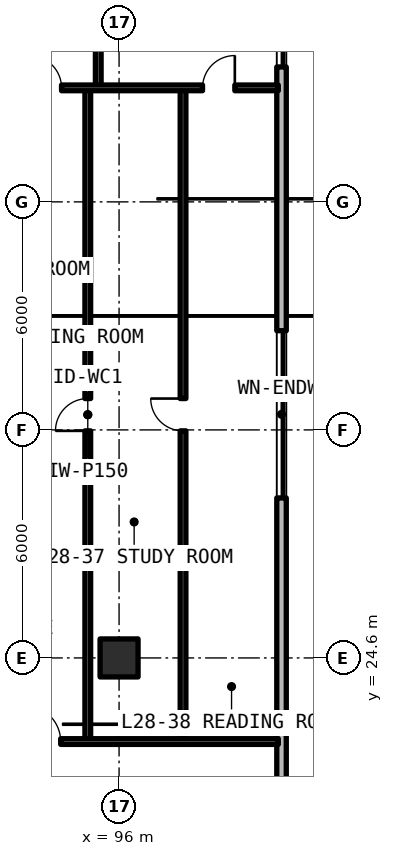
"""IFC4 building model, lengths in metres.
Left out: names, types, materials, properties, quantities, classifications, styles, units other than length and angle.
Written with IfcOpenShell. Run it as: python <this file> out.ifc"""

import sys

from ifc_helpers import new_model, si_unit, direction, frame, frame_2d, origin, origin_2d, place, context, subcontext, project, spatial, rectangle, extrude, element, fill, save


model = new_model("IFC4")
c1 = context("Model", 3, precision=1e-05, world=origin(), true_north=direction((0.0, 1.0)))
c2 = subcontext(c1, "Body", "Model", "MODEL_VIEW")
j1 = project(units=[si_unit("LENGTHUNIT", "METRE"), si_unit("PLANEANGLEUNIT", "RADIAN")], contexts=[c1])
p1 = place(None, origin())
s1 = spatial("IfcSite", under=j1, at=p1, CompositionType="ELEMENT")
p2 = place(p1, origin())
s2 = spatial("IfcBuilding", under=s1, at=p2, CompositionType="ELEMENT")
p3 = place(p2, frame((0.0, 0.0, 101.97)))
s3 = spatial("IfcBuildingStorey", under=s2, at=p3, CompositionType="ELEMENT", Elevation=101.97)
p4 = place(p3, frame((96.0, 24.6, 0.0), z_axis=(0.0, 0.0, 1.0), x_axis=(1.0, 0.0, 0.0)))
e1 = element("IfcColumn", 1, at=p4, inside=s3, PredefinedType="COLUMN", context=c2, shape_type="SweptSolid", body=[
    extrude(rectangle(XDim=1.0, YDim=1.0, at=origin_2d()), origin(), (0.0, 0.0, 1.0), 3.3),
])
p5 = place(p3, frame((100.275, 13.852, 0.0), z_axis=(0.0, 0.0, 1.0), x_axis=(0.0, 1.0, 0.0)))
e2 = element("IfcWall", 2, at=p5, inside=s3, PredefinedType="SOLIDWALL", context=c2, shape_type="SweptSolid", body=[
    extrude(rectangle(XDim=39.496, YDim=0.25, at=frame_2d((19.748, 0.0))), origin(), (0.0, 0.0, 1.0), 3.08),
])
p6 = place(p5, frame((1.948, 0.0, 0.0)))
e3 = element("IfcOpeningElement", 3, at=p6, cuts=e2, PredefinedType="OPENING", context=c2, shape_type="SweptSolid", body=[
    extrude(rectangle(XDim=1.1, YDim=2.15, at=frame_2d((0.55, 1.075))), frame((0.0, 0.135, 0.0), z_axis=(0.0, -1.0, 0.0), x_axis=(1.0, 0.0, 0.0)), (0.0, 0.0, 1.0), 0.27),
])
p7 = place(p5, frame((36.448, 0.0, 0.0)))
e4 = element("IfcOpeningElement", 4, at=p7, cuts=e2, PredefinedType="OPENING", context=c2, shape_type="SweptSolid", body=[
    extrude(rectangle(XDim=1.1, YDim=2.15, at=frame_2d((0.55, 1.075))), frame((0.0, 0.135, 0.0), z_axis=(0.0, -1.0, 0.0), x_axis=(1.0, 0.0, 0.0)), (0.0, 0.0, 1.0), 0.27),
])
p8 = place(p5, frame((14.958, 0.0, 0.78)))
e5 = element("IfcOpeningElement", 5, at=p8, cuts=e2, PredefinedType="OPENING", context=c2, shape_type="SweptSolid", body=[
    extrude(rectangle(XDim=4.4, YDim=1.66, at=frame_2d((2.2, 0.83))), frame((0.0, 0.135, 0.0), z_axis=(0.0, -1.0, 0.0), x_axis=(1.0, 0.0, 0.0)), (0.0, 0.0, 1.0), 0.27),
])
p9 = place(p5, frame((26.298, 0.0, 0.78)))
e6 = element("IfcOpeningElement", 6, at=p9, cuts=e2, PredefinedType="OPENING", context=c2, shape_type="SweptSolid", body=[
    extrude(rectangle(XDim=4.4, YDim=1.66, at=frame_2d((2.2, 0.83))), frame((0.0, 0.135, 0.0), z_axis=(0.0, -1.0, 0.0), x_axis=(1.0, 0.0, 0.0)), (0.0, 0.0, 1.0), 0.27),
])
p10 = place(p3, frame((95.177, 22.4, 0.0), z_axis=(0.0, 0.0, 1.0), x_axis=(0.0, 1.0, 0.0)))
e7 = element("IfcWall", 7, at=p10, inside=s3, PredefinedType="PARTITIONING", context=c2, shape_type="SweptSolid", body=[
    extrude(rectangle(XDim=17.2, YDim=0.15, at=frame_2d((8.6, 0.0))), origin(), (0.0, 0.0, 1.0), 2.35),
])
p11 = place(p10, frame((8.175, 0.0, 0.0)))
e8 = element("IfcOpeningElement", 8, at=p11, cuts=e7, PredefinedType="OPENING", context=c2, shape_type="SweptSolid", body=[
    extrude(rectangle(XDim=0.85, YDim=2.1, at=frame_2d((0.425, 1.05))), frame((0.0, 0.085, 0.0), z_axis=(0.0, -1.0, 0.0), x_axis=(1.0, 0.0, 0.0)), (0.0, 0.0, 1.0), 0.17),
])
p12 = place(p3, frame((97.683, 22.4, 0.0), z_axis=(0.0, 0.0, 1.0), x_axis=(0.0, 1.0, 0.0)))
e9 = element("IfcWall", 9, at=p12, inside=s3, PredefinedType="PARTITIONING", context=c2, shape_type="SweptSolid", body=[
    extrude(rectangle(XDim=17.2, YDim=0.15, at=frame_2d((8.6, 0.0))), origin(), (0.0, 0.0, 1.0), 2.35),
])
p13 = place(p12, frame((8.175, 0.0, 0.0)))
e10 = element("IfcOpeningElement", 10, at=p13, cuts=e9, PredefinedType="OPENING", context=c2, shape_type="SweptSolid", body=[
    extrude(rectangle(XDim=0.85, YDim=2.1, at=frame_2d((0.425, 1.05))), frame((0.0, 0.085, 0.0), z_axis=(0.0, -1.0, 0.0), x_axis=(1.0, 0.0, 0.0)), (0.0, 0.0, 1.0), 0.17),
])
p14 = place(p3, frame((95.452, 39.6, 0.0), z_axis=(0.0, 0.0, 1.0), x_axis=(0.0, 1.0, 0.0)))
e11 = element("IfcWall", 11, at=p14, inside=s3, PredefinedType="PARTITIONING", context=c2, shape_type="SweptSolid", body=[
    extrude(rectangle(XDim=5.2, YDim=0.15, at=frame_2d((2.6, 0.0))), origin(), (0.0, 0.0, 1.0), 2.35),
])
p15 = place(p3, frame((90.32, 39.6, 0.0), z_axis=(0.0, 0.0, 1.0), x_axis=(1.0, 0.0, 0.0)))
e12 = element("IfcWall", 12, at=p15, inside=s3, PredefinedType="PARTITIONING", context=c2, shape_type="SweptSolid", body=[
    extrude(rectangle(XDim=9.87, YDim=0.15, at=frame_2d((4.935, 0.0))), origin(), (0.0, 0.0, 1.0), 2.35),
])
p16 = place(p15, frame((3.316, 0.0, 0.0)))
e13 = element("IfcOpeningElement", 13, at=p16, cuts=e12, PredefinedType="OPENING", context=c2, shape_type="SweptSolid", body=[
    extrude(rectangle(XDim=0.85, YDim=2.1, at=frame_2d((0.425, 1.05))), frame((0.0, 0.085, 0.0), z_axis=(0.0, -1.0, 0.0), x_axis=(1.0, 0.0, 0.0)), (0.0, 0.0, 1.0), 0.17),
])
p17 = place(p15, frame((7.876, 0.0, 0.0)))
e14 = element("IfcOpeningElement", 14, at=p17, cuts=e12, PredefinedType="OPENING", context=c2, shape_type="SweptSolid", body=[
    extrude(rectangle(XDim=0.85, YDim=2.1, at=frame_2d((0.425, 1.05))), frame((0.0, 0.085, 0.0), z_axis=(0.0, -1.0, 0.0), x_axis=(1.0, 0.0, 0.0)), (0.0, 0.0, 1.0), 0.17),
])
p18 = place(p3, frame((90.32, 22.4, 0.0), z_axis=(0.0, 0.0, 1.0), x_axis=(1.0, 0.0, 0.0)))
e15 = element("IfcWall", 15, at=p18, inside=s3, PredefinedType="SOLIDWALL", context=c2, shape_type="SweptSolid", body=[
    extrude(rectangle(XDim=9.87, YDim=0.15, at=frame_2d((4.935, 0.0))), origin(), (0.0, 0.0, 1.0), 2.35),
])
p19 = place(p18, frame((3.193, 0.0, 0.0)))
e16 = element("IfcOpeningElement", 16, at=p19, cuts=e15, PredefinedType="OPENING", context=c2, shape_type="SweptSolid", body=[
    extrude(rectangle(XDim=0.95, YDim=2.15, at=frame_2d((0.475, 1.075))), frame((0.0, 0.085, 0.0), z_axis=(0.0, -1.0, 0.0), x_axis=(1.0, 0.0, 0.0)), (0.0, 0.0, 1.0), 0.17),
])
p20 = place(p8, origin())
e17 = element("IfcWindow", 17, at=p20, inside=s3, PartitioningType="SINGLE_PANEL", PredefinedType="WINDOW", context=c2, shape_type="SweptSolid", body=[
    extrude(rectangle(XDim=4.4, YDim=1.66, at=frame_2d((2.2, 0.83))), frame((0.0, 0.03, 0.0), z_axis=(0.0, -1.0, 0.0), x_axis=(1.0, 0.0, 0.0)), (0.0, 0.0, 1.0), 0.06),
])
fill(e5, e17)
p21 = place(p9, origin())
e18 = element("IfcWindow", 18, at=p21, inside=s3, PartitioningType="SINGLE_PANEL", PredefinedType="WINDOW", context=c2, shape_type="SweptSolid", body=[
    extrude(rectangle(XDim=4.4, YDim=1.66, at=frame_2d((2.2, 0.83))), frame((0.0, 0.03, 0.0), z_axis=(0.0, -1.0, 0.0), x_axis=(1.0, 0.0, 0.0)), (0.0, 0.0, 1.0), 0.06),
])
fill(e6, e18)
p22 = place(p11, origin())
e19 = element("IfcDoor", 19, at=p22, inside=s3, OperationType="SINGLE_SWING_LEFT", PredefinedType="DOOR", context=c2, shape_type="SweptSolid", body=[
    extrude(rectangle(XDim=0.85, YDim=2.1, at=frame_2d((0.425, 1.05))), frame((0.0, 0.025, 0.0), z_axis=(0.0, -1.0, 0.0), x_axis=(1.0, 0.0, 0.0)), (0.0, 0.0, 1.0), 0.05),
])
fill(e8, e19)
p23 = place(p13, origin())
e20 = element("IfcDoor", 20, at=p23, inside=s3, OperationType="SINGLE_SWING_RIGHT", PredefinedType="DOOR", context=c2, shape_type="SweptSolid", body=[
    extrude(rectangle(XDim=0.85, YDim=2.1, at=frame_2d((0.425, 1.05))), frame((0.0, 0.025, 0.0), z_axis=(0.0, -1.0, 0.0), x_axis=(1.0, 0.0, 0.0)), (0.0, 0.0, 1.0), 0.05),
])
fill(e10, e20)
p24 = place(p16, origin())
e21 = element("IfcDoor", 21, at=p24, inside=s3, OperationType="SINGLE_SWING_LEFT", PredefinedType="DOOR", context=c2, shape_type="SweptSolid", body=[
    extrude(rectangle(XDim=0.85, YDim=2.1, at=frame_2d((0.425, 1.05))), frame((0.0, 0.025, 0.0), z_axis=(0.0, -1.0, 0.0), x_axis=(1.0, 0.0, 0.0)), (0.0, 0.0, 1.0), 0.05),
])
fill(e13, e21)
p25 = place(p17, origin())
e22 = element("IfcDoor", 22, at=p25, inside=s3, OperationType="SINGLE_SWING_RIGHT", PredefinedType="DOOR", context=c2, shape_type="SweptSolid", body=[
    extrude(rectangle(XDim=0.85, YDim=2.1, at=frame_2d((0.425, 1.05))), frame((0.0, 0.025, 0.0), z_axis=(0.0, -1.0, 0.0), x_axis=(1.0, 0.0, 0.0)), (0.0, 0.0, 1.0), 0.05),
])
fill(e14, e22)
p26 = place(p19, origin())
e23 = element("IfcDoor", 23, at=p26, inside=s3, OperationType="SINGLE_SWING_LEFT", PredefinedType="DOOR", context=c2, shape_type="SweptSolid", body=[
    extrude(rectangle(XDim=0.95, YDim=2.15, at=frame_2d((0.475, 1.075))), frame((0.0, 0.025, 0.0), z_axis=(0.0, -1.0, 0.0), x_axis=(1.0, 0.0, 0.0)), (0.0, 0.0, 1.0), 0.05),
])
fill(e16, e23)
save(model, sys.argv[1])
